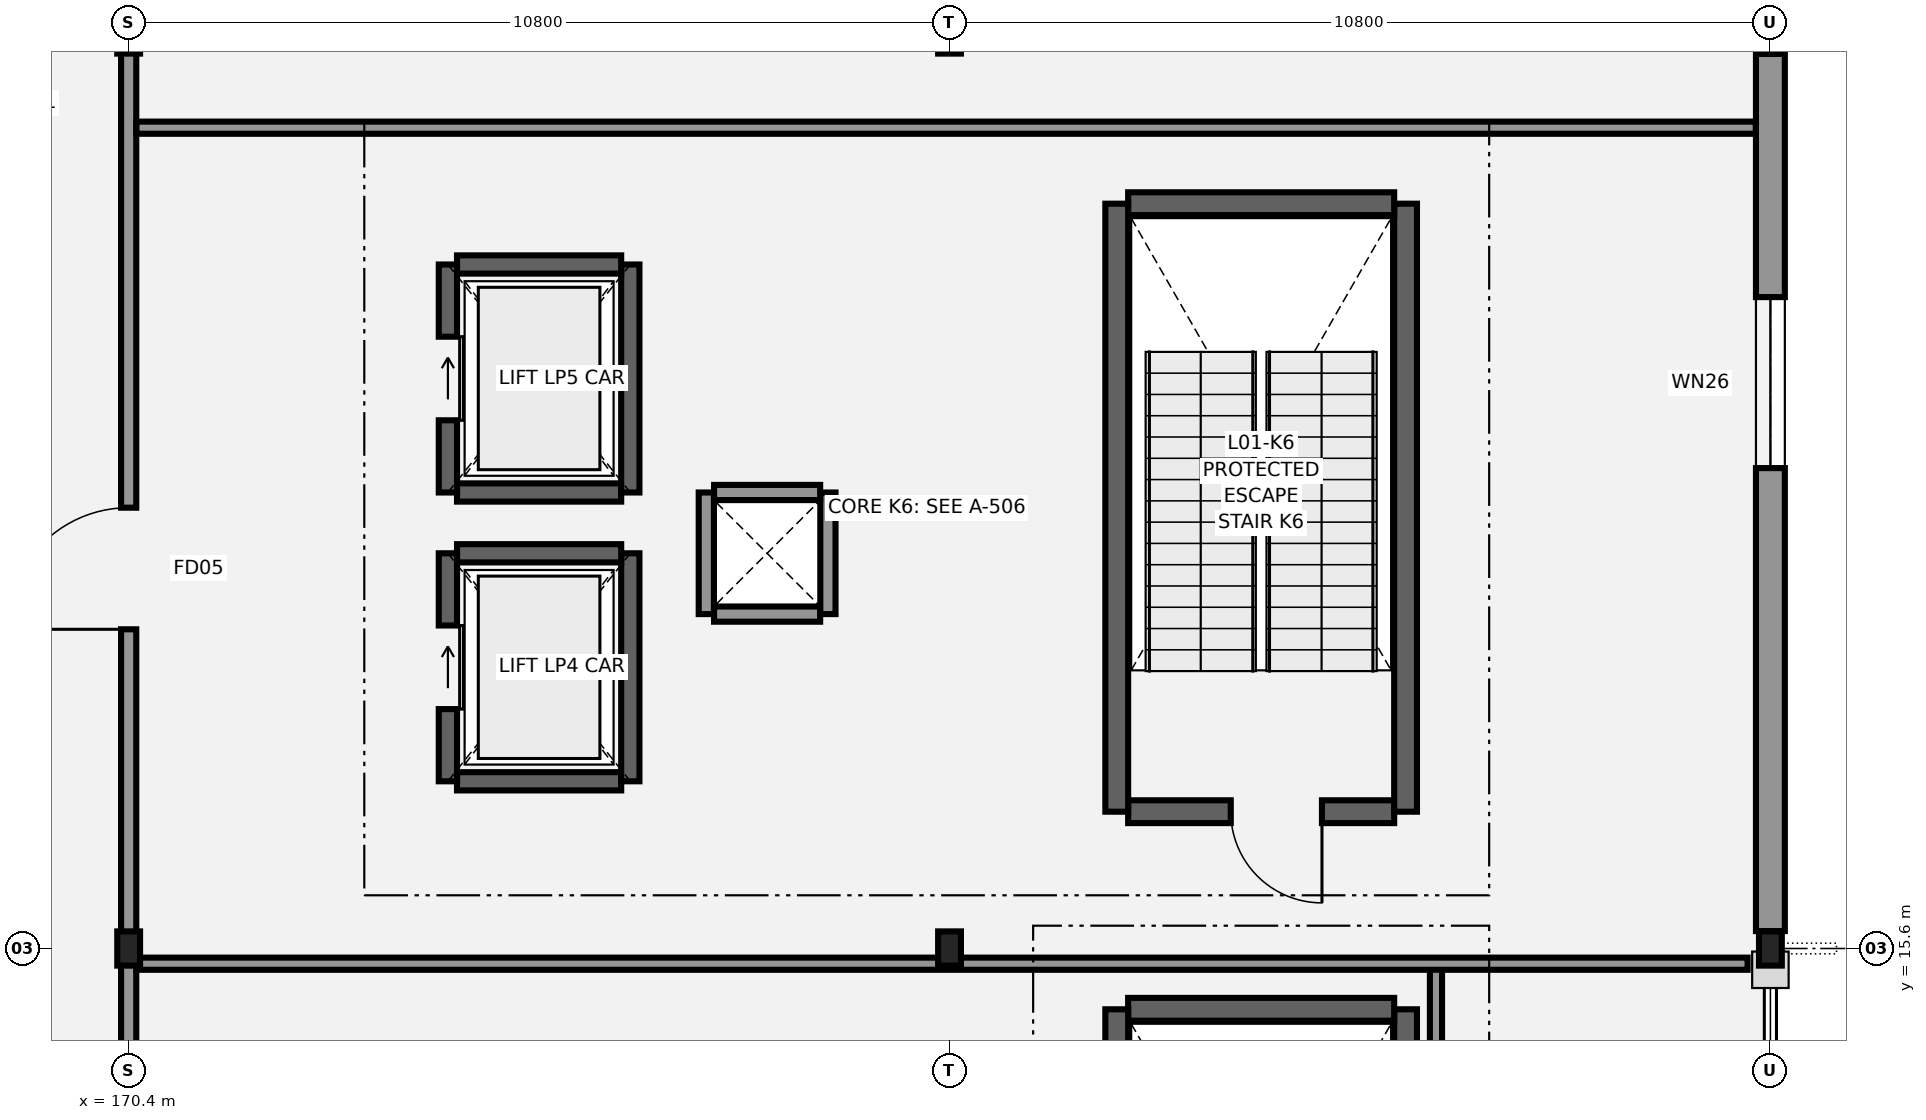
"""IFC4 building model, lengths in metres.
Left out: names, types, materials, properties, quantities, classifications, styles, units other than length and angle.
Written with IfcOpenShell. Run it as: python <this file> out.ifc"""

import sys

from ifc_helpers import new_model, si_unit, direction, frame, frame_2d, origin, origin_2d, place, context, subcontext, project, spatial, rectangle, i_section, extrude, element, fill, save


model = new_model("IFC4")
c1 = context("Model", 3, precision=1e-05, world=origin(), true_north=direction((0.0, 1.0)))
c2 = subcontext(c1, "Body", "Model", "MODEL_VIEW")
j1 = project(units=[si_unit("LENGTHUNIT", "METRE"), si_unit("PLANEANGLEUNIT", "RADIAN")], contexts=[c1])
p1 = place(None, origin())
s1 = spatial("IfcSite", under=j1, at=p1, CompositionType="ELEMENT")
p2 = place(p1, origin())
s2 = spatial("IfcBuilding", under=s1, at=p2, CompositionType="ELEMENT")
p3 = place(p2, frame((0.0, 0.0, 5.4)))
s3 = spatial("IfcBuildingStorey", under=s2, at=p3, CompositionType="ELEMENT", Elevation=5.4)
for number, where, z_axis, x_axis in (
    (1, (170.4, 15.6, 0.0), (0.0, 0.0, 1.0), (1.0, 0.0, 0.0)),
    (2, (170.4, 27.6, 0.0), (0.0, 0.0, 1.0), (1.0, 0.0, 0.0)),
    (3, (181.2, 15.6, 0.0), (0.0, 0.0, 1.0), (1.0, 0.0, 0.0)),
    (4, (181.2, 27.6, 0.0), (0.0, 0.0, 1.0), (1.0, 0.0, 0.0)),
    (5, (192.0, 15.6, 0.0), (0.0, 0.0, 1.0), (1.0, 0.0, 0.0)),
    (6, (192.0, 27.6, 0.0), (0.0, 0.0, 1.0), (1.0, 0.0, 0.0)),
):
    element("IfcColumn", number, at=place(p3, frame(where, z_axis=z_axis, x_axis=x_axis)), inside=s3, PredefinedType="COLUMN", context=c2, shape_type="SweptSolid", body=[
        extrude(i_section(OverallWidth=0.3, OverallDepth=0.45, WebThickness=0.014, FlangeThickness=0.026, FilletRadius=0.027, at=origin_2d()), origin(), (0.0, 0.0, 1.0), 4.8),
    ])
p4 = place(p3, frame((187.2, 6.8, 0.0), z_axis=(0.0, 0.0, 1.0), x_axis=(0.0, 1.0, 0.0)))
e7 = element("IfcWall", 7, at=p4, inside=s3, PredefinedType="SHEAR", context=c2, shape_type="SweptSolid", body=[
    extrude(rectangle(XDim=8.0, YDim=0.3, at=frame_2d((4.0, 0.0))), origin(), (0.0, 0.0, 1.0), 4.49),
])
p5 = place(p3, frame((187.05, 14.8, 0.0), z_axis=(0.0, 0.0, 1.0), x_axis=(-1.0, 0.0, 0.0)))
e8 = element("IfcWall", 8, at=p5, inside=s3, PredefinedType="SHEAR", context=c2, shape_type="SweptSolid", body=[
    extrude(rectangle(XDim=3.5, YDim=0.3, at=frame_2d((1.75, 0.0))), origin(), (0.0, 0.0, 1.0), 4.49),
])
p6 = place(p3, frame((183.4, 14.8, 0.0), z_axis=(0.0, 0.0, 1.0), x_axis=(0.0, -1.0, 0.0)))
e9 = element("IfcWall", 9, at=p6, inside=s3, PredefinedType="SHEAR", context=c2, shape_type="SweptSolid", body=[
    extrude(rectangle(XDim=8.0, YDim=0.3, at=frame_2d((4.0, 0.0))), origin(), (0.0, 0.0, 1.0), 4.49),
])
p7 = place(p3, frame((187.05, 17.4, 0.0), z_axis=(0.0, 0.0, 1.0), x_axis=(-1.0, 0.0, 0.0)))
e10 = element("IfcWall", 10, at=p7, inside=s3, PredefinedType="SHEAR", context=c2, shape_type="SweptSolid", body=[
    extrude(rectangle(XDim=3.5, YDim=0.3, at=frame_2d((1.75, 0.0))), origin(), (0.0, 0.0, 1.0), 4.49),
])
p8 = place(p7, frame((0.95, 0.0, 0.0)))
e11 = element("IfcOpeningElement", 11, at=p8, cuts=e10, PredefinedType="OPENING", context=c2, shape_type="SweptSolid", body=[
    extrude(rectangle(XDim=1.2, YDim=2.2, at=frame_2d((0.6, 1.1))), frame((0.0, 0.16, 0.0), z_axis=(0.0, -1.0, 0.0), x_axis=(1.0, 0.0, 0.0)), (0.0, 0.0, 1.0), 0.32),
])
p9 = place(p3, frame((187.2, 17.4, 0.0), z_axis=(0.0, 0.0, 1.0), x_axis=(0.0, 1.0, 0.0)))
e12 = element("IfcWall", 12, at=p9, inside=s3, PredefinedType="SHEAR", context=c2, shape_type="SweptSolid", body=[
    extrude(rectangle(XDim=8.0, YDim=0.3, at=frame_2d((4.0, 0.0))), origin(), (0.0, 0.0, 1.0), 4.49),
])
p10 = place(p3, frame((187.05, 25.4, 0.0), z_axis=(0.0, 0.0, 1.0), x_axis=(-1.0, 0.0, 0.0)))
e13 = element("IfcWall", 13, at=p10, inside=s3, PredefinedType="SHEAR", context=c2, shape_type="SweptSolid", body=[
    extrude(rectangle(XDim=3.5, YDim=0.3, at=frame_2d((1.75, 0.0))), origin(), (0.0, 0.0, 1.0), 4.49),
])
p11 = place(p3, frame((183.4, 25.4, 0.0), z_axis=(0.0, 0.0, 1.0), x_axis=(0.0, -1.0, 0.0)))
e14 = element("IfcWall", 14, at=p11, inside=s3, PredefinedType="SHEAR", context=c2, shape_type="SweptSolid", body=[
    extrude(rectangle(XDim=8.0, YDim=0.3, at=frame_2d((4.0, 0.0))), origin(), (0.0, 0.0, 1.0), 4.49),
])
p12 = place(p3, frame((174.72, 17.8, 0.0), z_axis=(0.0, 0.0, 1.0), x_axis=(1.0, 0.0, 0.0)))
e15 = element("IfcWall", 15, at=p12, inside=s3, PredefinedType="SHEAR", context=c2, shape_type="SweptSolid", body=[
    extrude(rectangle(XDim=2.16, YDim=0.24, at=frame_2d((1.08, 0.0))), origin(), (0.0, 0.0, 1.0), 4.49),
])
p13 = place(p3, frame((177.0, 17.8, 0.0), z_axis=(0.0, 0.0, 1.0), x_axis=(0.0, 1.0, 0.0)))
e16 = element("IfcWall", 16, at=p13, inside=s3, PredefinedType="SHEAR", context=c2, shape_type="SweptSolid", body=[
    extrude(rectangle(XDim=3.0, YDim=0.24, at=frame_2d((1.5, 0.0))), origin(), (0.0, 0.0, 1.0), 4.49),
])
p14 = place(p3, frame((176.88, 20.8, 0.0), z_axis=(0.0, 0.0, 1.0), x_axis=(-1.0, 0.0, 0.0)))
e17 = element("IfcWall", 17, at=p14, inside=s3, PredefinedType="SHEAR", context=c2, shape_type="SweptSolid", body=[
    extrude(rectangle(XDim=2.16, YDim=0.24, at=frame_2d((1.08, 0.0))), origin(), (0.0, 0.0, 1.0), 4.49),
])
p15 = place(p3, frame((174.6, 20.8, 0.0), z_axis=(0.0, 0.0, 1.0), x_axis=(0.0, -1.0, 0.0)))
e18 = element("IfcWall", 18, at=p15, inside=s3, PredefinedType="SHEAR", context=c2, shape_type="SweptSolid", body=[
    extrude(rectangle(XDim=3.0, YDim=0.24, at=frame_2d((1.5, 0.0))), origin(), (0.0, 0.0, 1.0), 4.49),
])
p16 = place(p15, frame((0.95, 0.0, 0.0)))
e19 = element("IfcOpeningElement", 19, at=p16, cuts=e18, PredefinedType="OPENING", context=c2, shape_type="SweptSolid", body=[
    extrude(rectangle(XDim=1.1, YDim=2.1, at=frame_2d((0.55, 1.05))), frame((0.0, 0.13, 0.0), z_axis=(0.0, -1.0, 0.0), x_axis=(1.0, 0.0, 0.0)), (0.0, 0.0, 1.0), 0.26),
])
p17 = place(p3, frame((174.72, 21.6, 0.0), z_axis=(0.0, 0.0, 1.0), x_axis=(1.0, 0.0, 0.0)))
e20 = element("IfcWall", 20, at=p17, inside=s3, PredefinedType="SHEAR", context=c2, shape_type="SweptSolid", body=[
    extrude(rectangle(XDim=2.16, YDim=0.24, at=frame_2d((1.08, 0.0))), origin(), (0.0, 0.0, 1.0), 4.49),
])
p18 = place(p3, frame((177.0, 21.6, 0.0), z_axis=(0.0, 0.0, 1.0), x_axis=(0.0, 1.0, 0.0)))
e21 = element("IfcWall", 21, at=p18, inside=s3, PredefinedType="SHEAR", context=c2, shape_type="SweptSolid", body=[
    extrude(rectangle(XDim=3.0, YDim=0.24, at=frame_2d((1.5, 0.0))), origin(), (0.0, 0.0, 1.0), 4.49),
])
p19 = place(p3, frame((176.88, 24.6, 0.0), z_axis=(0.0, 0.0, 1.0), x_axis=(-1.0, 0.0, 0.0)))
e22 = element("IfcWall", 22, at=p19, inside=s3, PredefinedType="SHEAR", context=c2, shape_type="SweptSolid", body=[
    extrude(rectangle(XDim=2.16, YDim=0.24, at=frame_2d((1.08, 0.0))), origin(), (0.0, 0.0, 1.0), 4.49),
])
p20 = place(p3, frame((174.6, 24.6, 0.0), z_axis=(0.0, 0.0, 1.0), x_axis=(0.0, -1.0, 0.0)))
e23 = element("IfcWall", 23, at=p20, inside=s3, PredefinedType="SHEAR", context=c2, shape_type="SweptSolid", body=[
    extrude(rectangle(XDim=3.0, YDim=0.24, at=frame_2d((1.5, 0.0))), origin(), (0.0, 0.0, 1.0), 4.49),
])
p21 = place(p20, frame((0.95, 0.0, 0.0)))
e24 = element("IfcOpeningElement", 24, at=p21, cuts=e23, PredefinedType="OPENING", context=c2, shape_type="SweptSolid", body=[
    extrude(rectangle(XDim=1.1, YDim=2.1, at=frame_2d((0.55, 1.05))), frame((0.0, 0.13, 0.0), z_axis=(0.0, -1.0, 0.0), x_axis=(1.0, 0.0, 0.0)), (0.0, 0.0, 1.0), 0.26),
])
p22 = place(p3, frame((192.0, 27.371, 0.0), z_axis=(0.0, 0.0, 1.0), x_axis=(0.0, -1.0, 0.0)))
e25 = element("IfcWall", 25, at=p22, inside=s3, PredefinedType="STANDARD", context=c2, shape_type="SweptSolid", body=[
    extrude(rectangle(XDim=11.542, YDim=0.38, at=frame_2d((5.771, 0.0))), origin(), (0.0, 0.0, 1.0), 4.135),
])
p23 = place(p22, frame((3.2, 0.0, 0.8)))
e26 = element("IfcOpeningElement", 26, at=p23, cuts=e25, PredefinedType="OPENING", context=c2, shape_type="SweptSolid", body=[
    extrude(rectangle(XDim=2.25, YDim=1.75, at=frame_2d((1.125, 0.875))), frame((0.0, 0.2, 0.0), z_axis=(0.0, -1.0, 0.0), x_axis=(1.0, 0.0, 0.0)), (0.0, 0.0, 1.0), 0.4),
])
p24 = place(p3, frame((170.4, 6.8, 0.0), z_axis=(0.0, 0.0, 1.0), x_axis=(0.0, 1.0, 0.0)))
e27 = element("IfcWall", 27, at=p24, inside=s3, PredefinedType="PARTITIONING", context=c2, shape_type="SweptSolid", body=[
    extrude(rectangle(XDim=56.628, YDim=0.2, at=frame_2d((28.314, 0.0))), origin(), (0.0, 0.0, 1.0), 4.135),
])
p25 = place(p24, frame((3.2, 0.0, 0.0)))
e28 = element("IfcOpeningElement", 28, at=p25, cuts=e27, PredefinedType="OPENING", context=c2, shape_type="SweptSolid", body=[
    extrude(rectangle(XDim=1.05, YDim=2.15, at=frame_2d((0.525, 1.075))), frame((0.0, 0.11, 0.0), z_axis=(0.0, -1.0, 0.0), x_axis=(1.0, 0.0, 0.0)), (0.0, 0.0, 1.0), 0.22),
])
p26 = place(p24, frame((13.0, 0.0, 0.0)))
e29 = element("IfcOpeningElement", 29, at=p26, cuts=e27, PredefinedType="OPENING", context=c2, shape_type="SweptSolid", body=[
    extrude(rectangle(XDim=1.6, YDim=2.2, at=frame_2d((0.8, 1.1))), frame((0.0, 0.11, 0.0), z_axis=(0.0, -1.0, 0.0), x_axis=(1.0, 0.0, 0.0)), (0.0, 0.0, 1.0), 0.22),
])
p27 = place(p24, frame((26.0, 0.0, 0.0)))
e30 = element("IfcOpeningElement", 30, at=p27, cuts=e27, PredefinedType="OPENING", context=c2, shape_type="SweptSolid", body=[
    extrude(rectangle(XDim=1.3, YDim=2.15, at=frame_2d((0.65, 1.075))), frame((0.0, 0.11, 0.0), z_axis=(0.0, -1.0, 0.0), x_axis=(1.0, 0.0, 0.0)), (0.0, 0.0, 1.0), 0.22),
])
p28 = place(p24, frame((47.6, 0.0, 0.0)))
e31 = element("IfcOpeningElement", 31, at=p28, cuts=e27, PredefinedType="OPENING", context=c2, shape_type="SweptSolid", body=[
    extrude(rectangle(XDim=1.3, YDim=2.15, at=frame_2d((0.65, 1.075))), frame((0.0, 0.11, 0.0), z_axis=(0.0, -1.0, 0.0), x_axis=(1.0, 0.0, 0.0)), (0.0, 0.0, 1.0), 0.22),
])
p29 = place(p24, frame((53.2, 0.0, 0.0)))
e32 = element("IfcOpeningElement", 32, at=p29, cuts=e27, PredefinedType="OPENING", context=c2, shape_type="SweptSolid", body=[
    extrude(rectangle(XDim=1.02, YDim=2.12, at=frame_2d((0.51, 1.06))), frame((0.0, 0.11, 0.0), z_axis=(0.0, -1.0, 0.0), x_axis=(1.0, 0.0, 0.0)), (0.0, 0.0, 1.0), 0.22),
])
p30 = place(p24, frame((4.6, 0.0, 1.05)))
e33 = element("IfcOpeningElement", 33, at=p30, cuts=e27, PredefinedType="OPENING", context=c2, shape_type="SweptSolid", body=[
    extrude(rectangle(XDim=2.8, YDim=1.3, at=frame_2d((1.4, 0.65))), frame((0.0, 0.11, 0.0), z_axis=(0.0, -1.0, 0.0), x_axis=(1.0, 0.0, 0.0)), (0.0, 0.0, 1.0), 0.22),
])
p31 = place(p3, frame((187.6, 4.482, 0.0), z_axis=(0.0, 0.0, 1.0), x_axis=(0.0, 1.0, 0.0)))
e34 = element("IfcWall", 34, at=p31, inside=s3, PredefinedType="PARTITIONING", context=c2, shape_type="SweptSolid", body=[
    extrude(rectangle(XDim=10.918, YDim=0.16, at=frame_2d((5.459, 0.0))), origin(), (0.0, 0.0, 1.0), 4.44),
])
p32 = place(p3, frame((170.502, 15.4, 0.0), z_axis=(0.0, 0.0, 1.0), x_axis=(1.0, 0.0, 0.0)))
e35 = element("IfcWall", 35, at=p32, inside=s3, PredefinedType="PARTITIONING", context=c2, shape_type="SweptSolid", body=[
    extrude(rectangle(XDim=21.198, YDim=0.16, at=frame_2d((10.599, 0.0))), origin(), (0.0, 0.0, 1.0), 4.045),
])
p33 = place(p3, frame((170.502, 26.4, 0.0), z_axis=(0.0, 0.0, 1.0), x_axis=(1.0, 0.0, 0.0)))
e36 = element("IfcWall", 36, at=p33, inside=s3, PredefinedType="PARTITIONING", context=c2, shape_type="SweptSolid", body=[
    extrude(rectangle(XDim=21.306, YDim=0.16, at=frame_2d((10.653, 0.0))), origin(), (0.0, 0.0, 1.0), 4.44),
])
p34 = place(p3, frame((178.102, 20.0, 0.0), z_axis=(0.0, 0.0, 1.0), x_axis=(1.0, 0.0, 0.0)))
e37 = element("IfcWall", 37, at=p34, inside=s3, PredefinedType="PARTITIONING", context=c2, shape_type="SweptSolid", body=[
    extrude(rectangle(XDim=1.396, YDim=0.2, at=frame_2d((0.698, 0.0))), origin(), (0.0, 0.0, 1.0), 4.44),
])
p35 = place(p3, frame((179.6, 20.0, 0.0), z_axis=(0.0, 0.0, 1.0), x_axis=(0.0, 1.0, 0.0)))
e38 = element("IfcWall", 38, at=p35, inside=s3, PredefinedType="PARTITIONING", context=c2, shape_type="SweptSolid", body=[
    extrude(rectangle(XDim=1.6, YDim=0.2, at=frame_2d((0.8, 0.0))), origin(), (0.0, 0.0, 1.0), 4.44),
])
p36 = place(p3, frame((179.498, 21.6, 0.0), z_axis=(0.0, 0.0, 1.0), x_axis=(-1.0, 0.0, 0.0)))
e39 = element("IfcWall", 39, at=p36, inside=s3, PredefinedType="PARTITIONING", context=c2, shape_type="SweptSolid", body=[
    extrude(rectangle(XDim=1.396, YDim=0.2, at=frame_2d((0.698, 0.0))), origin(), (0.0, 0.0, 1.0), 4.44),
])
p37 = place(p3, frame((178.0, 21.6, 0.0), z_axis=(0.0, 0.0, 1.0), x_axis=(0.0, -1.0, 0.0)))
e40 = element("IfcWall", 40, at=p37, inside=s3, PredefinedType="PARTITIONING", context=c2, shape_type="SweptSolid", body=[
    extrude(rectangle(XDim=1.6, YDim=0.2, at=frame_2d((0.8, 0.0))), origin(), (0.0, 0.0, 1.0), 4.44),
])
p38 = place(p23, origin())
e41 = element("IfcWindow", 41, at=p38, inside=s3, PartitioningType="SINGLE_PANEL", PredefinedType="WINDOW", context=c2, shape_type="SweptSolid", body=[
    extrude(rectangle(XDim=2.25, YDim=1.75, at=frame_2d((1.125, 0.875))), frame((0.0, 0.03, 0.0), z_axis=(0.0, -1.0, 0.0), x_axis=(1.0, 0.0, 0.0)), (0.0, 0.0, 1.0), 0.06),
])
fill(e26, e41)
p39 = place(p26, origin())
e42 = element("IfcDoor", 42, at=p39, inside=s3, OperationType="SINGLE_SWING_LEFT", PredefinedType="DOOR", context=c2, shape_type="SweptSolid", body=[
    extrude(rectangle(XDim=1.6, YDim=2.2, at=frame_2d((0.8, 1.1))), frame((0.0, 0.025, 0.0), z_axis=(0.0, -1.0, 0.0), x_axis=(1.0, 0.0, 0.0)), (0.0, 0.0, 1.0), 0.05),
])
fill(e29, e42)
p40 = place(p8, origin())
e43 = element("IfcDoor", 43, at=p40, inside=s3, OperationType="SINGLE_SWING_LEFT", PredefinedType="DOOR", context=c2, shape_type="SweptSolid", body=[
    extrude(rectangle(XDim=1.2, YDim=2.2, at=frame_2d((0.6, 1.1))), frame((0.0, 0.025, 0.0), z_axis=(0.0, -1.0, 0.0), x_axis=(1.0, 0.0, 0.0)), (0.0, 0.0, 1.0), 0.05),
])
fill(e11, e43)
p41 = place(p16, origin())
e44 = element("IfcDoor", 44, at=p41, inside=s3, OperationType="SLIDING_TO_LEFT", PredefinedType="DOOR", context=c2, shape_type="SweptSolid", body=[
    extrude(rectangle(XDim=1.1, YDim=2.1, at=frame_2d((0.55, 1.05))), frame((0.0, 0.025, 0.0), z_axis=(0.0, -1.0, 0.0), x_axis=(1.0, 0.0, 0.0)), (0.0, 0.0, 1.0), 0.05),
])
fill(e19, e44)
p42 = place(p21, origin())
e45 = element("IfcDoor", 45, at=p42, inside=s3, OperationType="SLIDING_TO_LEFT", PredefinedType="DOOR", context=c2, shape_type="SweptSolid", body=[
    extrude(rectangle(XDim=1.1, YDim=2.1, at=frame_2d((0.55, 1.05))), frame((0.0, 0.025, 0.0), z_axis=(0.0, -1.0, 0.0), x_axis=(1.0, 0.0, 0.0)), (0.0, 0.0, 1.0), 0.05),
])
fill(e24, e45)
save(model, sys.argv[1])
